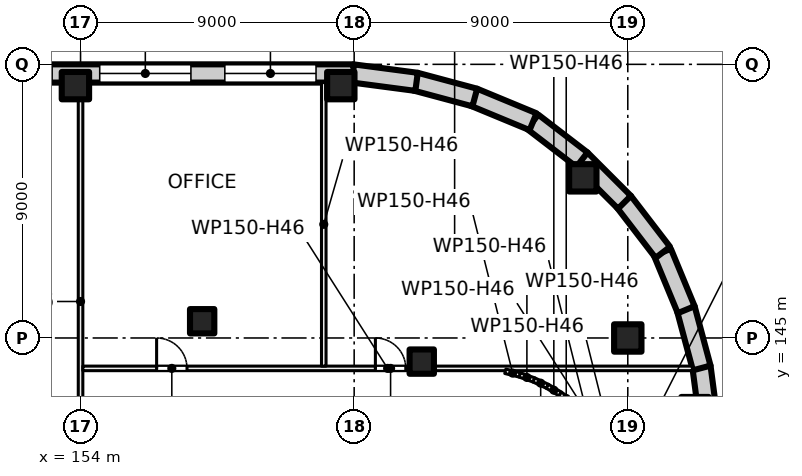
"""IFC4 building model, lengths in metres.
Left out: names, types, materials, properties, quantities, classifications, styles, units other than length and angle.
Written with IfcOpenShell. Run it as: python <this file> out.ifc"""

import sys

from ifc_helpers import new_model, si_unit, direction, frame, frame_2d, origin, origin_2d, place, context, subcontext, project, spatial, rectangle, extrude, element, fill, save


model = new_model("IFC4")
c1 = context("Model", 3, precision=1e-05, world=origin(), true_north=direction((0.0, 1.0)))
c2 = subcontext(c1, "Body", "Model", "MODEL_VIEW")
j1 = project(units=[si_unit("LENGTHUNIT", "METRE"), si_unit("PLANEANGLEUNIT", "RADIAN")], contexts=[c1])
p1 = place(None, origin())
s1 = spatial("IfcSite", under=j1, at=p1, CompositionType="ELEMENT")
p2 = place(p1, origin())
s2 = spatial("IfcBuilding", under=s1, at=p2, CompositionType="ELEMENT")
p3 = place(p2, frame((0.0, 0.0, 7.5)))
s3 = spatial("IfcBuildingStorey", under=s2, at=p3, CompositionType="ELEMENT", Elevation=7.5)
for number, where, z_axis, x_axis in (
    (1, (172.0, 145.0, 0.0), (0.0, 0.0, 1.0), (1.0, 0.0, 0.0)),
    (2, (153.831, 153.3, 0.0), (0.0, 0.0, 1.0), (1.0, 0.0, 0.0)),
    (3, (162.561, 153.3, 0.0), (0.0, 0.0, 1.0), (1.0, 0.0, 0.0)),
    (4, (170.521, 150.267, 0.0), (0.0, 0.0, 1.0), (1.0, 0.0, 0.0)),
):
    element("IfcColumn", number, at=place(p3, frame(where, z_axis=z_axis, x_axis=x_axis)), inside=s3, PredefinedType="COLUMN", context=c2, shape_type="SweptSolid", body=[
        extrude(rectangle(XDim=0.9, YDim=0.9, at=origin_2d()), origin(), (0.0, 0.0, 1.0), 5.0),
    ])
for number, where, z_axis, x_axis in (
    (5, (165.223, 144.223, 0.0), (0.0, 0.0, 1.0), (1.0, 0.0, 0.0)),
    (6, (158.0, 145.55, 0.0), (0.0, 0.0, 1.0), (1.0, 0.0, 0.0)),
):
    element("IfcColumn", number, at=place(p3, frame(where, z_axis=z_axis, x_axis=x_axis)), inside=s3, PredefinedType="COLUMN", context=c2, shape_type="SweptSolid", body=[
        extrude(rectangle(XDim=0.8, YDim=0.8, at=origin_2d()), origin(), (0.0, 0.0, 1.0), 5.0),
    ])
p4 = place(p3, frame((174.424, 144.052, 0.0), z_axis=(0.0, 0.0, 1.0), x_axis=(0.130558200013, -0.991440646942, 0.0)))
e7 = element("IfcWall", 7, at=p4, inside=s3, PredefinedType="SOLIDWALL", context=c2, shape_type="SweptSolid", body=[
    extrude(rectangle(XDim=2.132, YDim=0.6, at=frame_2d((1.066, 0.0))), origin(), (0.0, 0.0, 1.0), 4.6),
])
p5 = place(p3, frame((173.908, 145.968, 0.0), z_axis=(0.0, 0.0, 1.0), x_axis=(0.258804467146, -0.965929732323, 0.0)))
e8 = element("IfcWall", 8, at=p5, inside=s3, PredefinedType="SOLIDWALL", context=c2, shape_type="SweptSolid", body=[
    extrude(rectangle(XDim=2.022, YDim=0.6, at=frame_2d((1.011, 0.0))), origin(), (0.0, 0.0, 1.0), 4.6),
])
p6 = place(p3, frame((173.14, 147.819, 0.0), z_axis=(0.0, 0.0, 1.0), x_axis=(0.382341242798, -0.924021197839, 0.0)))
e9 = element("IfcWall", 9, at=p6, inside=s3, PredefinedType="SOLIDWALL", context=c2, shape_type="SweptSolid", body=[
    extrude(rectangle(XDim=2.044, YDim=0.6, at=frame_2d((1.022, 0.0))), origin(), (0.0, 0.0, 1.0), 4.6),
])
p7 = place(p3, frame((171.865, 149.493, 0.0), z_axis=(0.0, 0.0, 1.0), x_axis=(0.609052002567, -0.79313029079, 0.0)))
e10 = element("IfcWall", 10, at=p7, inside=s3, PredefinedType="SOLIDWALL", context=c2, shape_type="SweptSolid", body=[
    extrude(rectangle(XDim=2.114, YDim=0.6, at=frame_2d((1.057, 0.0))), origin(), (0.0, 0.0, 1.0), 4.6),
])
p8 = place(p3, frame((170.463, 150.89, 0.0), z_axis=(0.0, 0.0, 1.0), x_axis=(0.707106781187, -0.707106781187, 0.0)))
e11 = element("IfcWall", 11, at=p8, inside=s3, PredefinedType="SOLIDWALL", context=c2, shape_type="SweptSolid", body=[
    extrude(rectangle(XDim=2.018, YDim=0.6, at=frame_2d((1.009, 0.0))), origin(), (0.0, 0.0, 1.0), 4.6),
])
p9 = place(p3, frame((168.872, 152.109, 0.0), z_axis=(0.0, 0.0, 1.0), x_axis=(0.793125485267, -0.609058260448, 0.0)))
e12 = element("IfcWall", 12, at=p9, inside=s3, PredefinedType="SOLIDWALL", context=c2, shape_type="SweptSolid", body=[
    extrude(rectangle(XDim=2.044, YDim=0.6, at=frame_2d((1.022, 0.0))), origin(), (0.0, 0.0, 1.0), 4.6),
])
p10 = place(p3, frame((166.931, 152.921, 0.0), z_axis=(0.0, 0.0, 1.0), x_axis=(0.924006983526, -0.382375593358, 0.0)))
e13 = element("IfcWall", 13, at=p10, inside=s3, PredefinedType="SOLIDWALL", context=c2, shape_type="SweptSolid", body=[
    extrude(rectangle(XDim=2.114, YDim=0.6, at=frame_2d((1.057, 0.0))), origin(), (0.0, 0.0, 1.0), 4.6),
])
p11 = place(p3, frame((165.014, 153.432, 0.0), z_axis=(0.0, 0.0, 1.0), x_axis=(0.965929732323, -0.258804467146, 0.0)))
e14 = element("IfcWall", 14, at=p11, inside=s3, PredefinedType="SOLIDWALL", context=c2, shape_type="SweptSolid", body=[
    extrude(rectangle(XDim=2.022, YDim=0.6, at=frame_2d((1.011, 0.0))), origin(), (0.0, 0.0, 1.0), 4.6),
])
p12 = place(p3, frame((162.939, 153.703, 0.0), z_axis=(0.0, 0.0, 1.0), x_axis=(0.991440646942, -0.130558200013, 0.0)))
e15 = element("IfcWall", 15, at=p12, inside=s3, PredefinedType="SOLIDWALL", context=c2, shape_type="SweptSolid", body=[
    extrude(rectangle(XDim=2.132, YDim=0.6, at=frame_2d((1.066, 0.0))), origin(), (0.0, 0.0, 1.0), 4.6),
])
p13 = place(p3, frame((131.022, 153.7, 0.0), z_axis=(0.0, 0.0, 1.0), x_axis=(1.0, 0.0, 0.0)))
e16 = element("IfcWall", 16, at=p13, inside=s3, PredefinedType="SOLIDWALL", context=c2, shape_type="SweptSolid", body=[
    extrude(rectangle(XDim=31.957, YDim=0.6, at=frame_2d((15.978, 0.0))), origin(), (0.0, 0.0, 1.0), 4.6),
])
p14 = place(p13, frame((0.783, 0.0, 0.9)))
e17 = element("IfcOpeningElement", 17, at=p14, cuts=e16, PredefinedType="OPENING", context=c2, shape_type="SweptSolid", body=[
    extrude(rectangle(XDim=3.0, YDim=3.0, at=frame_2d((1.5, 1.5))), frame((0.0, 0.31, 0.0), z_axis=(0.0, -1.0, 0.0), x_axis=(1.0, 0.0, 0.0)), (0.0, 0.0, 1.0), 0.62),
])
p15 = place(p13, frame((9.913, 0.0, 0.9)))
e18 = element("IfcOpeningElement", 18, at=p15, cuts=e16, PredefinedType="OPENING", context=c2, shape_type="SweptSolid", body=[
    extrude(rectangle(XDim=3.0, YDim=3.0, at=frame_2d((1.5, 1.5))), frame((0.0, 0.31, 0.0), z_axis=(0.0, -1.0, 0.0), x_axis=(1.0, 0.0, 0.0)), (0.0, 0.0, 1.0), 0.62),
])
p16 = place(p13, frame((14.928, 0.0, 0.9)))
e19 = element("IfcOpeningElement", 19, at=p16, cuts=e16, PredefinedType="OPENING", context=c2, shape_type="SweptSolid", body=[
    extrude(rectangle(XDim=3.0, YDim=3.0, at=frame_2d((1.5, 1.5))), frame((0.0, 0.31, 0.0), z_axis=(0.0, -1.0, 0.0), x_axis=(1.0, 0.0, 0.0)), (0.0, 0.0, 1.0), 0.62),
])
p17 = place(p13, frame((19.043, 0.0, 0.9)))
e20 = element("IfcOpeningElement", 20, at=p17, cuts=e16, PredefinedType="OPENING", context=c2, shape_type="SweptSolid", body=[
    extrude(rectangle(XDim=3.0, YDim=3.0, at=frame_2d((1.5, 1.5))), frame((0.0, 0.31, 0.0), z_axis=(0.0, -1.0, 0.0), x_axis=(1.0, 0.0, 0.0)), (0.0, 0.0, 1.0), 0.62),
])
p18 = place(p13, frame((23.609, 0.0, 0.9)))
e21 = element("IfcOpeningElement", 21, at=p18, cuts=e16, PredefinedType="OPENING", context=c2, shape_type="SweptSolid", body=[
    extrude(rectangle(XDim=3.0, YDim=3.0, at=frame_2d((1.5, 1.5))), frame((0.0, 0.31, 0.0), z_axis=(0.0, -1.0, 0.0), x_axis=(1.0, 0.0, 0.0)), (0.0, 0.0, 1.0), 0.62),
])
p19 = place(p13, frame((27.724, 0.0, 0.9)))
e22 = element("IfcOpeningElement", 22, at=p19, cuts=e16, PredefinedType="OPENING", context=c2, shape_type="SweptSolid", body=[
    extrude(rectangle(XDim=3.0, YDim=3.0, at=frame_2d((1.5, 1.5))), frame((0.0, 0.31, 0.0), z_axis=(0.0, -1.0, 0.0), x_axis=(1.0, 0.0, 0.0)), (0.0, 0.0, 1.0), 0.62),
])
p20 = place(p3, frame((154.0, 153.4, 0.0), z_axis=(0.0, 0.0, 1.0), x_axis=(0.0, -1.0, 0.0)))
e23 = element("IfcWall", 23, at=p20, inside=s3, PredefinedType="PARTITIONING", context=c2, shape_type="SweptSolid", body=[
    extrude(rectangle(XDim=14.4, YDim=0.15, at=frame_2d((7.2, 0.0))), origin(), (0.0, 0.0, 1.0), 4.6),
])
p21 = place(p20, frame((11.0, 0.0, 0.0)))
e24 = element("IfcOpeningElement", 24, at=p21, cuts=e23, PredefinedType="OPENING", context=c2, shape_type="SweptSolid", body=[
    extrude(rectangle(XDim=1.8, YDim=2.1, at=frame_2d((0.9, 1.05))), frame((0.0, 0.085, 0.0), z_axis=(0.0, -1.0, 0.0), x_axis=(1.0, 0.0, 0.0)), (0.0, 0.0, 1.0), 0.17),
])
p22 = place(p3, frame((154.075, 144.0, 0.0), z_axis=(0.0, 0.0, 1.0), x_axis=(1.0, 0.0, 0.0)))
e25 = element("IfcWall", 25, at=p22, inside=s3, PredefinedType="PARTITIONING", context=c2, shape_type="SweptSolid", body=[
    extrude(rectangle(XDim=20.05, YDim=0.15, at=frame_2d((10.025, 0.0))), origin(), (0.0, 0.0, 1.0), 4.6),
])
p23 = place(p22, frame((2.427, 0.0, 0.0)))
e26 = element("IfcOpeningElement", 26, at=p23, cuts=e25, PredefinedType="OPENING", context=c2, shape_type="SweptSolid", body=[
    extrude(rectangle(XDim=1.0, YDim=2.1, at=frame_2d((0.5, 1.05))), frame((0.0, 0.085, 0.0), z_axis=(0.0, -1.0, 0.0), x_axis=(1.0, 0.0, 0.0)), (0.0, 0.0, 1.0), 0.17),
])
p24 = place(p22, frame((9.623, 0.0, 0.0)))
e27 = element("IfcOpeningElement", 27, at=p24, cuts=e25, PredefinedType="OPENING", context=c2, shape_type="SweptSolid", body=[
    extrude(rectangle(XDim=1.0, YDim=2.1, at=frame_2d((0.5, 1.05))), frame((0.0, 0.085, 0.0), z_axis=(0.0, -1.0, 0.0), x_axis=(1.0, 0.0, 0.0)), (0.0, 0.0, 1.0), 0.17),
])
p25 = place(p3, frame((162.0, 144.075, 0.0), z_axis=(0.0, 0.0, 1.0), x_axis=(0.0, 1.0, 0.0)))
e28 = element("IfcWall", 28, at=p25, inside=s3, PredefinedType="PARTITIONING", context=c2, shape_type="SweptSolid", body=[
    extrude(rectangle(XDim=9.325, YDim=0.15, at=frame_2d((4.663, 0.0))), origin(), (0.0, 0.0, 1.0), 4.6),
])
p26 = place(p3, frame((167.971, 143.905, 0.0), z_axis=(0.0, 0.0, 1.0), x_axis=(0.970113715952, -0.242650732785, 0.0)))
e29 = element("IfcWall", 29, at=p26, inside=s3, PredefinedType="PARTITIONING", context=c2, shape_type="SweptSolid", body=[
    extrude(rectangle(XDim=0.499, YDim=0.15, at=frame_2d((0.25, 0.0))), origin(), (0.0, 0.0, 1.0), 4.6),
])
for number, where, z_axis, x_axis in (
    (30, (168.447, 143.786, 0.0), (0.0, 0.0, 1.0), (0.941, -0.337, 0.0)),
    (31, (168.91, 143.621, 0.0), (0.0, 0.0, 1.0), (0.904, -0.428, 0.0)),
):
    element("IfcWall", number, at=place(p3, frame(where, z_axis=z_axis, x_axis=x_axis)), inside=s3, PredefinedType="PARTITIONING", context=c2, shape_type="SweptSolid", body=[
        extrude(rectangle(XDim=0.498, YDim=0.15, at=frame_2d((0.249, 0.0))), origin(), (0.0, 0.0, 1.0), 4.6),
    ])
p27 = place(p3, frame((169.354, 143.412, 0.0), z_axis=(0.0, 0.0, 1.0), x_axis=(0.85671397893, -0.515791778052, 0.0)))
e32 = element("IfcWall", 32, at=p27, inside=s3, PredefinedType="PARTITIONING", context=c2, shape_type="SweptSolid", body=[
    extrude(rectangle(XDim=0.499, YDim=0.15, at=frame_2d((0.249, 0.0))), origin(), (0.0, 0.0, 1.0), 4.6),
])
p28 = place(p3, frame((169.775, 143.159, 0.0), z_axis=(0.0, 0.0, 1.0), x_axis=(0.80404358372, -0.594570362092, 0.0)))
e33 = element("IfcWall", 33, at=p28, inside=s3, PredefinedType="PARTITIONING", context=c2, shape_type="SweptSolid", body=[
    extrude(rectangle(XDim=0.498, YDim=0.15, at=frame_2d((0.249, 0.0))), origin(), (0.0, 0.0, 1.0), 4.6),
])
p29 = place(p18, origin())
e34 = element("IfcWindow", 34, at=p29, inside=s3, PartitioningType="SINGLE_PANEL", PredefinedType="WINDOW", context=c2, shape_type="SweptSolid", body=[
    extrude(rectangle(XDim=3.0, YDim=3.0, at=frame_2d((1.5, 1.5))), frame((0.0, 0.03, 0.0), z_axis=(0.0, -1.0, 0.0), x_axis=(1.0, 0.0, 0.0)), (0.0, 0.0, 1.0), 0.06),
])
fill(e21, e34)
p30 = place(p19, origin())
e35 = element("IfcWindow", 35, at=p30, inside=s3, PartitioningType="SINGLE_PANEL", PredefinedType="WINDOW", context=c2, shape_type="SweptSolid", body=[
    extrude(rectangle(XDim=3.0, YDim=3.0, at=frame_2d((1.5, 1.5))), frame((0.0, 0.03, 0.0), z_axis=(0.0, -1.0, 0.0), x_axis=(1.0, 0.0, 0.0)), (0.0, 0.0, 1.0), 0.06),
])
fill(e22, e35)
p31 = place(p23, origin())
e36 = element("IfcDoor", 36, at=p31, inside=s3, OperationType="SINGLE_SWING_LEFT", PredefinedType="DOOR", context=c2, shape_type="SweptSolid", body=[
    extrude(rectangle(XDim=1.0, YDim=2.1, at=frame_2d((0.5, 1.05))), frame((0.0, 0.025, 0.0), z_axis=(0.0, -1.0, 0.0), x_axis=(1.0, 0.0, 0.0)), (0.0, 0.0, 1.0), 0.05),
])
fill(e26, e36)
p32 = place(p24, origin())
e37 = element("IfcDoor", 37, at=p32, inside=s3, OperationType="SINGLE_SWING_LEFT", PredefinedType="DOOR", context=c2, shape_type="SweptSolid", body=[
    extrude(rectangle(XDim=1.0, YDim=2.1, at=frame_2d((0.5, 1.05))), frame((0.0, 0.025, 0.0), z_axis=(0.0, -1.0, 0.0), x_axis=(1.0, 0.0, 0.0)), (0.0, 0.0, 1.0), 0.05),
])
fill(e27, e37)
save(model, sys.argv[1])
